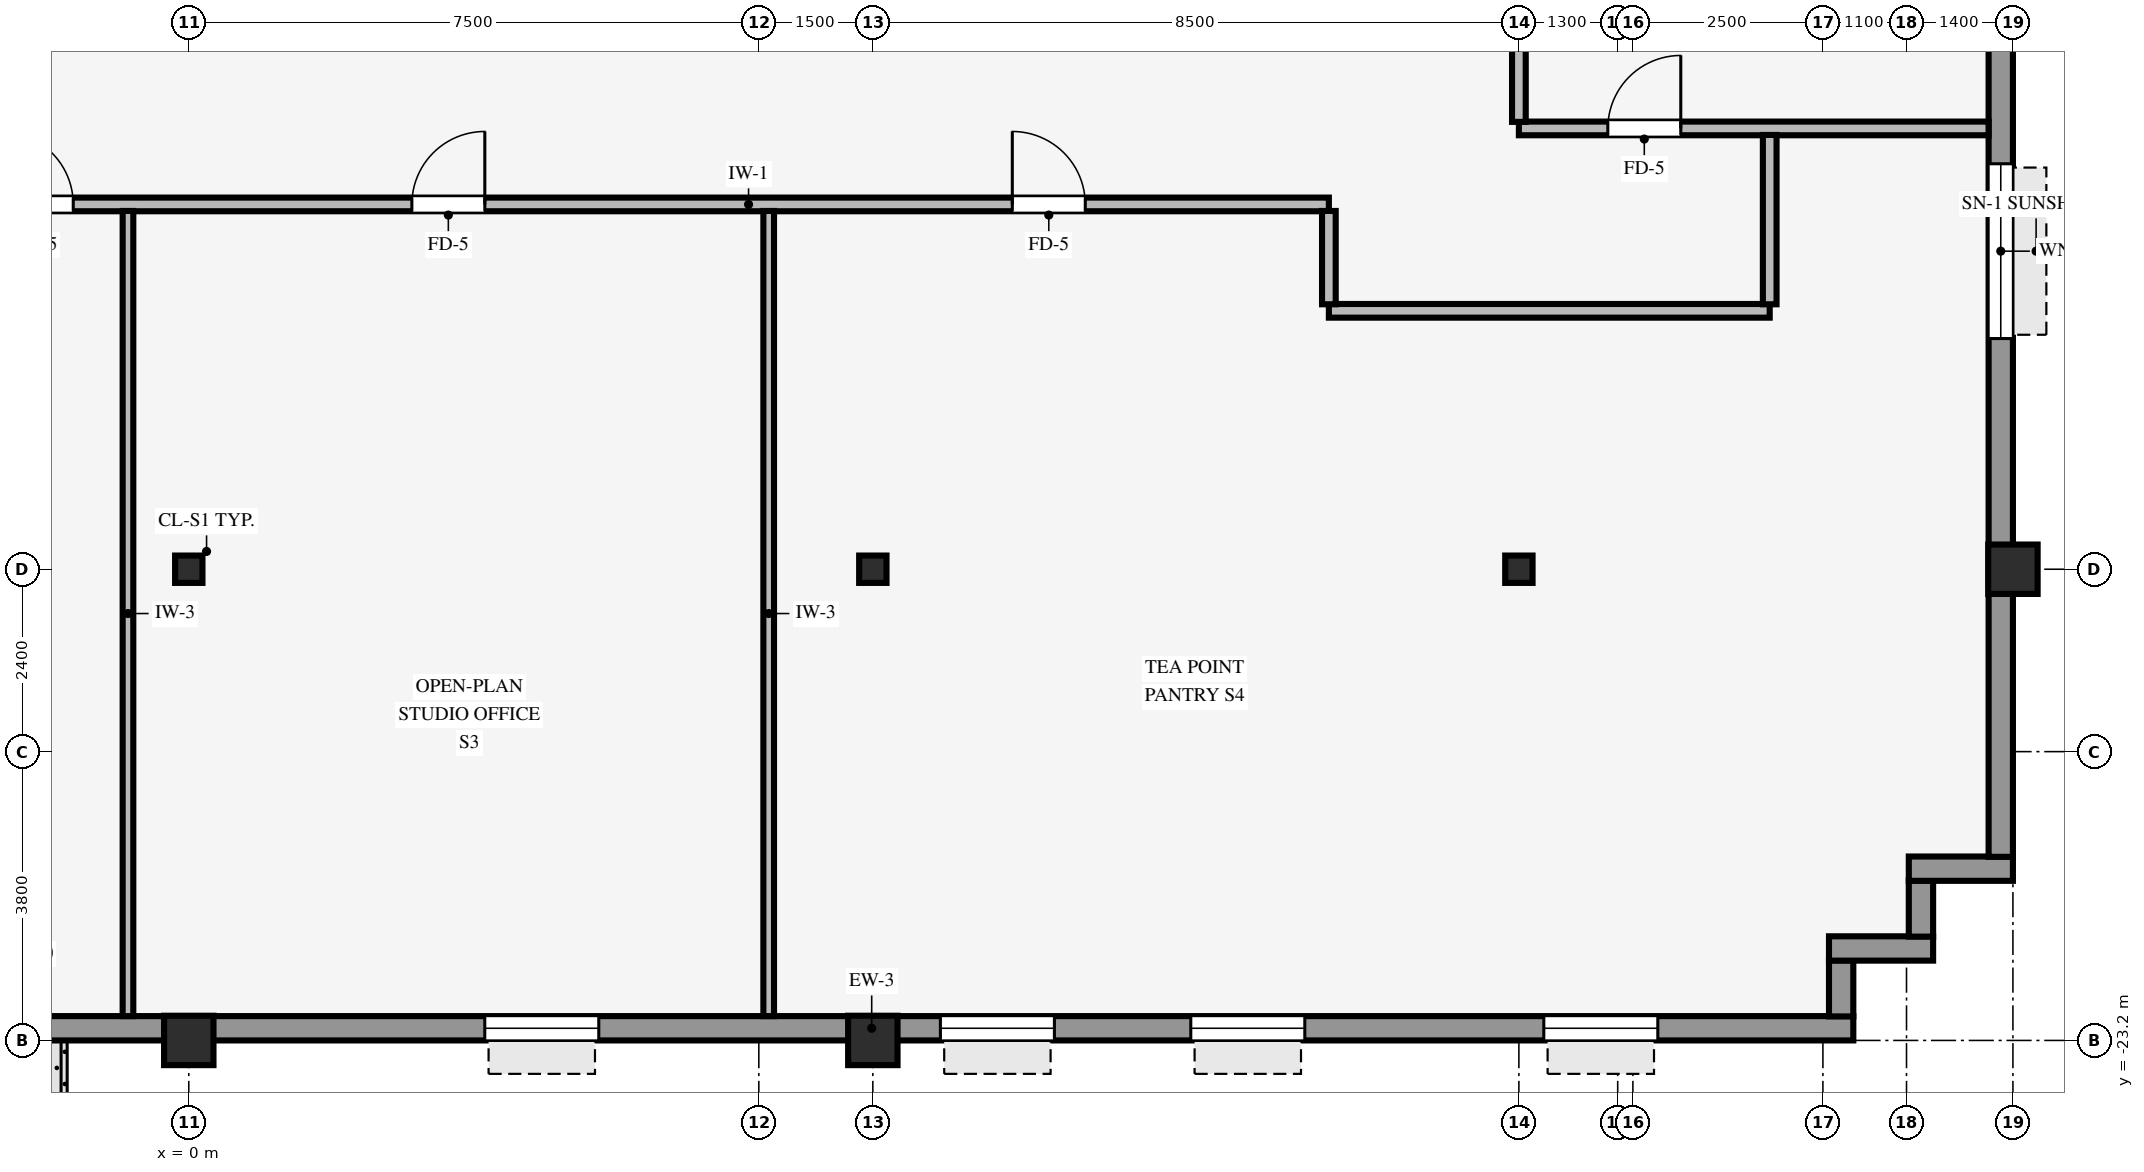
"""IFC4 building model, lengths in metres.
Left out: names, types, materials, properties, quantities, classifications, styles, units other than length and angle.
Written with IfcOpenShell. Run it as: python <this file> out.ifc"""

import sys

from ifc_helpers import new_model, si_unit, direction, frame, frame_2d, origin, origin_2d, place, context, subcontext, project, spatial, rectangle, hollow_rectangle, i_section, extrude, source, transform, mapped, element, fill, save


model = new_model("IFC4")
c1 = context("Model", 3, precision=1e-05, world=origin(), true_north=direction((0.0, 1.0)))
c2 = subcontext(c1, "Body", "Model", "MODEL_VIEW")
j1 = project(units=[si_unit("LENGTHUNIT", "METRE"), si_unit("PLANEANGLEUNIT", "RADIAN")], contexts=[c1])
p1 = place(None, origin())
s1 = spatial("IfcSite", under=j1, at=p1, CompositionType="ELEMENT")
p2 = place(p1, origin())
s2 = spatial("IfcBuilding", under=s1, at=p2, CompositionType="ELEMENT")
p3 = place(p2, frame((0.0, 0.0, 109.25)))
s3 = spatial("IfcBuildingStorey", under=s2, at=p3, CompositionType="ELEMENT", Elevation=109.25)
for number, where, z_axis, x_axis in (
    (1, (24.0, -17.0, 0.0), (0.0, 0.0, 1.0), (1.0, 0.0, 0.0)),
    (2, (0.0, -23.2, 0.0), (0.0, 0.0, 1.0), (1.0, 0.0, 0.0)),
    (3, (9.0, -23.2, 0.0), (0.0, 0.0, 1.0), (1.0, 0.0, 0.0)),
):
    element("IfcColumn", number, at=place(p3, frame(where, z_axis=z_axis, x_axis=x_axis)), inside=s3, PredefinedType="COLUMN", context=c2, shape_type="SweptSolid", body=[
        extrude(hollow_rectangle(XDim=0.65, YDim=0.65, WallThickness=0.04, InnerFilletRadius=0.04, OuterFilletRadius=0.08, at=origin_2d()), origin(), (0.0, 0.0, 1.0), 3.37),
    ])
for number, where, z_axis, x_axis in (
    (4, (0.0, -17.0, 0.0), (0.0, 0.0, 1.0), (1.0, 0.0, 0.0)),
    (5, (9.0, -17.0, 0.0), (0.0, 0.0, 1.0), (1.0, 0.0, 0.0)),
    (6, (17.5, -17.0, 0.0), (0.0, 0.0, 1.0), (1.0, 0.0, 0.0)),
):
    element("IfcColumn", number, at=place(p3, frame(where, z_axis=z_axis, x_axis=x_axis)), inside=s3, PredefinedType="COLUMN", context=c2, shape_type="SweptSolid", body=[
        extrude(i_section(OverallWidth=0.36, OverallDepth=0.36, WebThickness=0.021, FlangeThickness=0.021, FilletRadius=0.018, at=origin_2d()), origin(), (0.0, 0.0, 1.0), 3.37),
    ])
p4 = place(p3, frame((-21.9, -23.04, 0.0), z_axis=(0.0, 0.0, 1.0), x_axis=(1.0, 0.0, 0.0)))
e7 = element("IfcWall", 7, at=p4, inside=s3, PredefinedType="STANDARD", context=c2, shape_type="SweptSolid", body=[
    extrude(rectangle(XDim=43.8, YDim=0.32, at=frame_2d((21.9, 0.0))), origin(), (0.0, 0.0, 1.0), 2.705),
])
p5 = place(p4, frame((17.55, 0.0, 0.0), z_axis=(0.0, 0.0, 1.0), x_axis=(-1.0, 0.0, 0.0)))
e8 = element("IfcOpeningElement", 8, at=p5, cuts=e7, PredefinedType="OPENING", context=c2, shape_type="SweptSolid", body=[
    extrude(rectangle(XDim=1.05, YDim=2.1, at=frame_2d((0.525, 1.05))), frame((0.0, 0.17, 0.0), z_axis=(0.0, -1.0, 0.0), x_axis=(1.0, 0.0, 0.0)), (0.0, 0.0, 1.0), 0.34),
])
p6 = place(p4, frame((2.572, 0.0, 0.8)))
e9 = element("IfcOpeningElement", 9, at=p6, cuts=e7, PredefinedType="OPENING", context=c2, shape_type="SweptSolid", body=[
    extrude(rectangle(XDim=1.5, YDim=1.6, at=frame_2d((0.75, 0.8))), frame((0.0, 0.17, 0.0), z_axis=(0.0, -1.0, 0.0), x_axis=(1.0, 0.0, 0.0)), (0.0, 0.0, 1.0), 0.34),
])
p7 = place(p4, frame((6.767, 0.0, 0.8)))
e10 = element("IfcOpeningElement", 10, at=p7, cuts=e7, PredefinedType="OPENING", context=c2, shape_type="SweptSolid", body=[
    extrude(rectangle(XDim=1.5, YDim=1.6, at=frame_2d((0.75, 0.8))), frame((0.0, 0.17, 0.0), z_axis=(0.0, -1.0, 0.0), x_axis=(1.0, 0.0, 0.0)), (0.0, 0.0, 1.0), 0.34),
])
p8 = place(p4, frame((10.511, 0.0, 0.8)))
e11 = element("IfcOpeningElement", 11, at=p8, cuts=e7, PredefinedType="OPENING", context=c2, shape_type="SweptSolid", body=[
    extrude(rectangle(XDim=1.5, YDim=1.6, at=frame_2d((0.75, 0.8))), frame((0.0, 0.17, 0.0), z_axis=(0.0, -1.0, 0.0), x_axis=(1.0, 0.0, 0.0)), (0.0, 0.0, 1.0), 0.34),
])
p9 = place(p4, frame((25.794, 0.0, 0.8)))
e12 = element("IfcOpeningElement", 12, at=p9, cuts=e7, PredefinedType="OPENING", context=c2, shape_type="SweptSolid", body=[
    extrude(rectangle(XDim=1.5, YDim=1.6, at=frame_2d((0.75, 0.8))), frame((0.0, 0.17, 0.0), z_axis=(0.0, -1.0, 0.0), x_axis=(1.0, 0.0, 0.0)), (0.0, 0.0, 1.0), 0.34),
])
p10 = place(p4, frame((31.789, 0.0, 0.8)))
e13 = element("IfcOpeningElement", 13, at=p10, cuts=e7, PredefinedType="OPENING", context=c2, shape_type="SweptSolid", body=[
    extrude(rectangle(XDim=1.5, YDim=1.6, at=frame_2d((0.75, 0.8))), frame((0.0, 0.17, 0.0), z_axis=(0.0, -1.0, 0.0), x_axis=(1.0, 0.0, 0.0)), (0.0, 0.0, 1.0), 0.34),
])
p11 = place(p4, frame((35.083, 0.0, 0.8)))
e14 = element("IfcOpeningElement", 14, at=p11, cuts=e7, PredefinedType="OPENING", context=c2, shape_type="SweptSolid", body=[
    extrude(rectangle(XDim=1.5, YDim=1.6, at=frame_2d((0.75, 0.8))), frame((0.0, 0.17, 0.0), z_axis=(0.0, -1.0, 0.0), x_axis=(1.0, 0.0, 0.0)), (0.0, 0.0, 1.0), 0.34),
])
p12 = place(p4, frame((39.728, 0.0, 0.8)))
e15 = element("IfcOpeningElement", 15, at=p12, cuts=e7, PredefinedType="OPENING", context=c2, shape_type="SweptSolid", body=[
    extrude(rectangle(XDim=1.5, YDim=1.6, at=frame_2d((0.75, 0.8))), frame((0.0, 0.17, 0.0), z_axis=(0.0, -1.0, 0.0), x_axis=(1.0, 0.0, 0.0)), (0.0, 0.0, 1.0), 0.34),
])
p13 = place(p3, frame((21.74, -22.884, 0.0), z_axis=(0.0, 0.0, 1.0), x_axis=(0.0, 1.0, 0.0)))
e16 = element("IfcWall", 16, at=p13, inside=s3, PredefinedType="STANDARD", context=c2, shape_type="SweptSolid", body=[
    extrude(rectangle(XDim=0.738, YDim=0.32, at=frame_2d((0.369, 0.0))), origin(), (0.0, 0.0, 1.0), 3.36),
])
p14 = place(p3, frame((21.58, -21.99, 0.0), z_axis=(0.0, 0.0, 1.0), x_axis=(1.0, 0.0, 0.0)))
e17 = element("IfcWall", 17, at=p14, inside=s3, PredefinedType="STANDARD", context=c2, shape_type="SweptSolid", body=[
    extrude(rectangle(XDim=1.37, YDim=0.32, at=frame_2d((0.685, 0.0))), origin(), (0.0, 0.0, 1.0), 3.36),
])
p15 = place(p3, frame((22.79, -21.834, 0.0), z_axis=(0.0, 0.0, 1.0), x_axis=(0.0, 1.0, 0.0)))
e18 = element("IfcWall", 18, at=p15, inside=s3, PredefinedType="STANDARD", context=c2, shape_type="SweptSolid", body=[
    extrude(rectangle(XDim=0.738, YDim=0.32, at=frame_2d((0.369, 0.0))), origin(), (0.0, 0.0, 1.0), 3.36),
])
p16 = place(p3, frame((22.63, -20.94, 0.0), z_axis=(0.0, 0.0, 1.0), x_axis=(1.0, 0.0, 0.0)))
e19 = element("IfcWall", 19, at=p16, inside=s3, PredefinedType="STANDARD", context=c2, shape_type="SweptSolid", body=[
    extrude(rectangle(XDim=1.37, YDim=0.32, at=frame_2d((0.685, 0.0))), origin(), (0.0, 0.0, 1.0), 3.36),
])
p17 = place(p3, frame((23.84, -20.784, 0.0), z_axis=(0.0, 0.0, 1.0), x_axis=(0.0, 1.0, 0.0)))
e20 = element("IfcWall", 20, at=p17, inside=s3, PredefinedType="STANDARD", context=c2, shape_type="SweptSolid", body=[
    extrude(rectangle(XDim=41.568, YDim=0.32, at=frame_2d((20.784, 0.0))), origin(), (0.0, 0.0, 1.0), 2.705),
])
p18 = place(p17, frame((6.819, 0.0, 0.8)))
e21 = element("IfcOpeningElement", 21, at=p18, cuts=e20, PredefinedType="OPENING", context=c2, shape_type="SweptSolid", body=[
    extrude(rectangle(XDim=2.3, YDim=1.62, at=frame_2d((1.15, 0.81))), frame((0.0, 0.17, 0.0), z_axis=(0.0, -1.0, 0.0), x_axis=(1.0, 0.0, 0.0)), (0.0, 0.0, 1.0), 0.34),
])
p19 = place(p17, frame((12.215, 0.0, 0.8)))
e22 = element("IfcOpeningElement", 22, at=p19, cuts=e20, PredefinedType="OPENING", context=c2, shape_type="SweptSolid", body=[
    extrude(rectangle(XDim=2.3, YDim=1.62, at=frame_2d((1.15, 0.81))), frame((0.0, 0.17, 0.0), z_axis=(0.0, -1.0, 0.0), x_axis=(1.0, 0.0, 0.0)), (0.0, 0.0, 1.0), 0.34),
])
p20 = place(p17, frame((17.161, 0.0, 0.8)))
e23 = element("IfcOpeningElement", 23, at=p20, cuts=e20, PredefinedType="OPENING", context=c2, shape_type="SweptSolid", body=[
    extrude(rectangle(XDim=2.3, YDim=1.62, at=frame_2d((1.15, 0.81))), frame((0.0, 0.17, 0.0), z_axis=(0.0, -1.0, 0.0), x_axis=(1.0, 0.0, 0.0)), (0.0, 0.0, 1.0), 0.34),
])
p21 = place(p17, frame((22.107, 0.0, 0.8)))
e24 = element("IfcOpeningElement", 24, at=p21, cuts=e20, PredefinedType="OPENING", context=c2, shape_type="SweptSolid", body=[
    extrude(rectangle(XDim=2.3, YDim=1.62, at=frame_2d((1.15, 0.81))), frame((0.0, 0.17, 0.0), z_axis=(0.0, -1.0, 0.0), x_axis=(1.0, 0.0, 0.0)), (0.0, 0.0, 1.0), 0.34),
])
p22 = place(p17, frame((27.053, 0.0, 0.8)))
e25 = element("IfcOpeningElement", 25, at=p22, cuts=e20, PredefinedType="OPENING", context=c2, shape_type="SweptSolid", body=[
    extrude(rectangle(XDim=2.3, YDim=1.62, at=frame_2d((1.15, 0.81))), frame((0.0, 0.17, 0.0), z_axis=(0.0, -1.0, 0.0), x_axis=(1.0, 0.0, 0.0)), (0.0, 0.0, 1.0), 0.34),
])
p23 = place(p17, frame((32.449, 0.0, 0.8)))
e26 = element("IfcOpeningElement", 26, at=p23, cuts=e20, PredefinedType="OPENING", context=c2, shape_type="SweptSolid", body=[
    extrude(rectangle(XDim=2.3, YDim=1.62, at=frame_2d((1.15, 0.81))), frame((0.0, 0.17, 0.0), z_axis=(0.0, -1.0, 0.0), x_axis=(1.0, 0.0, 0.0)), (0.0, 0.0, 1.0), 0.34),
])
p24 = place(p3, frame((15.0, -13.6, 0.0), z_axis=(0.0, 0.0, 1.0), x_axis=(1.0, 0.0, 0.0)))
e27 = element("IfcWall", 27, at=p24, inside=s3, PredefinedType="PARTITIONING", context=c2, shape_type="SweptSolid", body=[
    extrude(rectangle(XDim=5.8, YDim=0.18, at=frame_2d((2.9, 0.0))), origin(), (0.0, 0.0, 1.0), 2.998),
])
p25 = place(p3, frame((-15.0, -12.2, 0.0), z_axis=(0.0, 0.0, 1.0), x_axis=(1.0, 0.0, 0.0)))
e28 = element("IfcWall", 28, at=p25, inside=s3, PredefinedType="PARTITIONING", context=c2, shape_type="SweptSolid", body=[
    extrude(rectangle(XDim=30.0, YDim=0.18, at=frame_2d((15.0, 0.0))), origin(), (0.0, 0.0, 1.0), 3.36),
])
p26 = place(p25, frame((17.935, 0.0, 0.0)))
e29 = element("IfcOpeningElement", 29, at=p26, cuts=e28, PredefinedType="OPENING", context=c2, shape_type="SweptSolid", body=[
    extrude(rectangle(XDim=0.96, YDim=2.1, at=frame_2d((0.48, 1.05))), frame((0.0, 0.1, 0.0), z_axis=(0.0, -1.0, 0.0), x_axis=(1.0, 0.0, 0.0)), (0.0, 0.0, 1.0), 0.2),
])
p27 = place(p25, frame((25.835, 0.0, 0.0)))
e30 = element("IfcOpeningElement", 30, at=p27, cuts=e28, PredefinedType="OPENING", context=c2, shape_type="SweptSolid", body=[
    extrude(rectangle(XDim=0.96, YDim=2.1, at=frame_2d((0.48, 1.05))), frame((0.0, 0.1, 0.0), z_axis=(0.0, -1.0, 0.0), x_axis=(1.0, 0.0, 0.0)), (0.0, 0.0, 1.0), 0.2),
])
p28 = place(p25, frame((5.45, 0.0, 0.0)))
e31 = element("IfcOpeningElement", 31, at=p28, cuts=e28, PredefinedType="OPENING", context=c2, shape_type="SweptSolid", body=[
    extrude(rectangle(XDim=0.9, YDim=2.1, at=frame_2d((0.45, 1.05))), frame((0.0, 0.1, 0.0), z_axis=(0.0, -1.0, 0.0), x_axis=(1.0, 0.0, 0.0)), (0.0, 0.0, 1.0), 0.2),
])
p29 = place(p25, frame((2.85, 0.0, 0.0)))
e32 = element("IfcOpeningElement", 32, at=p29, cuts=e28, PredefinedType="OPENING", context=c2, shape_type="SweptSolid", body=[
    extrude(rectangle(XDim=0.9, YDim=2.1, at=frame_2d((0.45, 1.05))), frame((0.0, 0.1, 0.0), z_axis=(0.0, -1.0, 0.0), x_axis=(1.0, 0.0, 0.0)), (0.0, 0.0, 1.0), 0.2),
])
p30 = place(p25, frame((12.52, 0.0, 0.0)))
e33 = element("IfcOpeningElement", 33, at=p30, cuts=e28, PredefinedType="OPENING", context=c2, shape_type="SweptSolid", body=[
    extrude(rectangle(XDim=0.96, YDim=2.1, at=frame_2d((0.48, 1.05))), frame((0.0, 0.1, 0.0), z_axis=(0.0, -1.0, 0.0), x_axis=(1.0, 0.0, 0.0)), (0.0, 0.0, 1.0), 0.2),
])
p31 = place(p25, frame((7.95, 0.0, 0.0)))
e34 = element("IfcOpeningElement", 34, at=p31, cuts=e28, PredefinedType="OPENING", context=c2, shape_type="SweptSolid", body=[
    extrude(rectangle(XDim=0.9, YDim=2.1, at=frame_2d((0.45, 1.05))), frame((0.0, 0.1, 0.0), z_axis=(0.0, -1.0, 0.0), x_axis=(1.0, 0.0, 0.0)), (0.0, 0.0, 1.0), 0.2),
])
p32 = place(p3, frame((17.5, -11.2, 0.0), z_axis=(0.0, 0.0, 1.0), x_axis=(1.0, 0.0, 0.0)))
e35 = element("IfcWall", 35, at=p32, inside=s3, PredefinedType="PARTITIONING", context=c2, shape_type="SweptSolid", body=[
    extrude(rectangle(XDim=6.18, YDim=0.18, at=frame_2d((3.09, 0.0))), origin(), (0.0, 0.0, 1.0), 3.36),
])
p33 = place(p32, frame((1.17, 0.0, 0.0)))
e36 = element("IfcOpeningElement", 36, at=p33, cuts=e35, PredefinedType="OPENING", context=c2, shape_type="SweptSolid", body=[
    extrude(rectangle(XDim=0.96, YDim=2.1, at=frame_2d((0.48, 1.05))), frame((0.0, 0.1, 0.0), z_axis=(0.0, -1.0, 0.0), x_axis=(1.0, 0.0, 0.0)), (0.0, 0.0, 1.0), 0.2),
])
for number, where, z_axis, x_axis in (
    (37, (-0.8, -22.88, 0.0), (0.0, 0.0, 1.0), (0.0, 1.0, 0.0)),
    (38, (7.63, -22.88, 0.0), (0.0, 0.0, 1.0), (0.0, 1.0, 0.0)),
):
    element("IfcWall", number, at=place(p3, frame(where, z_axis=z_axis, x_axis=x_axis)), inside=s3, PredefinedType="PARTITIONING", context=c2, shape_type="SweptSolid", body=[
        extrude(rectangle(XDim=10.594, YDim=0.14, at=frame_2d((5.297, 0.0))), origin(), (0.0, 0.0, 1.0), 3.36),
    ])
p34 = place(p3, frame((15.0, -13.514, 0.0), z_axis=(0.0, 0.0, 1.0), x_axis=(0.0, 1.0, 0.0)))
e39 = element("IfcWall", 39, at=p34, inside=s3, PredefinedType="PARTITIONING", context=c2, shape_type="SweptSolid", body=[
    extrude(rectangle(XDim=1.228, YDim=0.18, at=frame_2d((0.614, 0.0))), origin(), (0.0, 0.0, 1.0), 3.36),
])
p35 = place(p3, frame((17.5, -11.114, 0.0), z_axis=(0.0, 0.0, 1.0), x_axis=(0.0, 1.0, 0.0)))
e40 = element("IfcWall", 40, at=p35, inside=s3, PredefinedType="PARTITIONING", context=c2, shape_type="SweptSolid", body=[
    extrude(rectangle(XDim=0.968, YDim=0.18, at=frame_2d((0.484, 0.0))), origin(), (0.0, 0.0, 1.0), 2.738),
])
p36 = place(p3, frame((20.8, -13.514, 0.0), z_axis=(0.0, 0.0, 1.0), x_axis=(0.0, 1.0, 0.0)))
e41 = element("IfcWall", 41, at=p36, inside=s3, PredefinedType="PARTITIONING", context=c2, shape_type="SweptSolid", body=[
    extrude(rectangle(XDim=2.228, YDim=0.18, at=frame_2d((1.114, 0.0))), origin(), (0.0, 0.0, 1.0), 3.36),
])
m1 = source(origin(), c2, "Body", "SweptSolid", [
    extrude(rectangle(XDim=1.5, YDim=1.6, at=frame_2d((0.75, 0.8))), frame((0.0, 0.03, 0.0), z_axis=(0.0, -1.0, 0.0), x_axis=(1.0, 0.0, 0.0)), (0.0, 0.0, 1.0), 0.06),
])
p37 = place(p9, origin())
e42 = element("IfcWindow", 42, at=p37, inside=s3, PartitioningType="SINGLE_PANEL", PredefinedType="WINDOW", context=c2, shape_type="MappedRepresentation", body=[
    mapped(m1, transform((0.0, 0.0, 0.0), scale=1.0)),
])
fill(e12, e42)
p38 = place(p10, origin())
e43 = element("IfcWindow", 43, at=p38, inside=s3, PartitioningType="SINGLE_PANEL", PredefinedType="WINDOW", context=c2, shape_type="MappedRepresentation", body=[
    mapped(m1, transform((0.0, 0.0, 0.0), scale=1.0)),
])
fill(e13, e43)
p39 = place(p11, origin())
e44 = element("IfcWindow", 44, at=p39, inside=s3, PartitioningType="SINGLE_PANEL", PredefinedType="WINDOW", context=c2, shape_type="MappedRepresentation", body=[
    mapped(m1, transform((0.0, 0.0, 0.0), scale=1.0)),
])
fill(e14, e44)
p40 = place(p12, origin())
e45 = element("IfcWindow", 45, at=p40, inside=s3, PartitioningType="SINGLE_PANEL", PredefinedType="WINDOW", context=c2, shape_type="MappedRepresentation", body=[
    mapped(m1, transform((0.0, 0.0, 0.0), scale=1.0)),
])
fill(e15, e45)
m2 = source(origin(), c2, "Body", "SweptSolid", [
    extrude(rectangle(XDim=2.3, YDim=1.62, at=frame_2d((1.15, 0.81))), frame((0.0, 0.03, 0.0), z_axis=(0.0, -1.0, 0.0), x_axis=(1.0, 0.0, 0.0)), (0.0, 0.0, 1.0), 0.06),
])
p41 = place(p18, origin())
e46 = element("IfcWindow", 46, at=p41, inside=s3, PartitioningType="SINGLE_PANEL", PredefinedType="WINDOW", context=c2, shape_type="MappedRepresentation", body=[
    mapped(m2, transform((0.0, 0.0, 0.0), scale=1.0)),
])
fill(e21, e46)
m3 = source(origin(), c2, "Body", "SweptSolid", [
    extrude(rectangle(XDim=0.96, YDim=2.1, at=frame_2d((0.48, 1.05))), frame((0.0, 0.025, 0.0), z_axis=(0.0, -1.0, 0.0), x_axis=(1.0, 0.0, 0.0)), (0.0, 0.0, 1.0), 0.05),
])
p42 = place(p26, origin())
e47 = element("IfcDoor", 47, at=p42, inside=s3, OperationType="SINGLE_SWING_RIGHT", PredefinedType="DOOR", context=c2, shape_type="MappedRepresentation", body=[
    mapped(m3, transform((0.0, 0.0, 0.0), scale=1.0)),
])
fill(e29, e47)
p43 = place(p27, origin())
e48 = element("IfcDoor", 48, at=p43, inside=s3, OperationType="SINGLE_SWING_LEFT", PredefinedType="DOOR", context=c2, shape_type="MappedRepresentation", body=[
    mapped(m3, transform((0.0, 0.0, 0.0), scale=1.0)),
])
fill(e30, e48)
p44 = place(p33, origin())
e49 = element("IfcDoor", 49, at=p44, inside=s3, OperationType="SINGLE_SWING_RIGHT", PredefinedType="DOOR", context=c2, shape_type="MappedRepresentation", body=[
    mapped(m3, transform((0.0, 0.0, 0.0), scale=1.0)),
])
fill(e36, e49)
p45 = place(p30, origin())
e50 = element("IfcDoor", 50, at=p45, inside=s3, OperationType="SINGLE_SWING_LEFT", PredefinedType="DOOR", context=c2, shape_type="MappedRepresentation", body=[
    mapped(m3, transform((0.0, 0.0, 0.0), scale=1.0)),
])
fill(e33, e50)
save(model, sys.argv[1])
